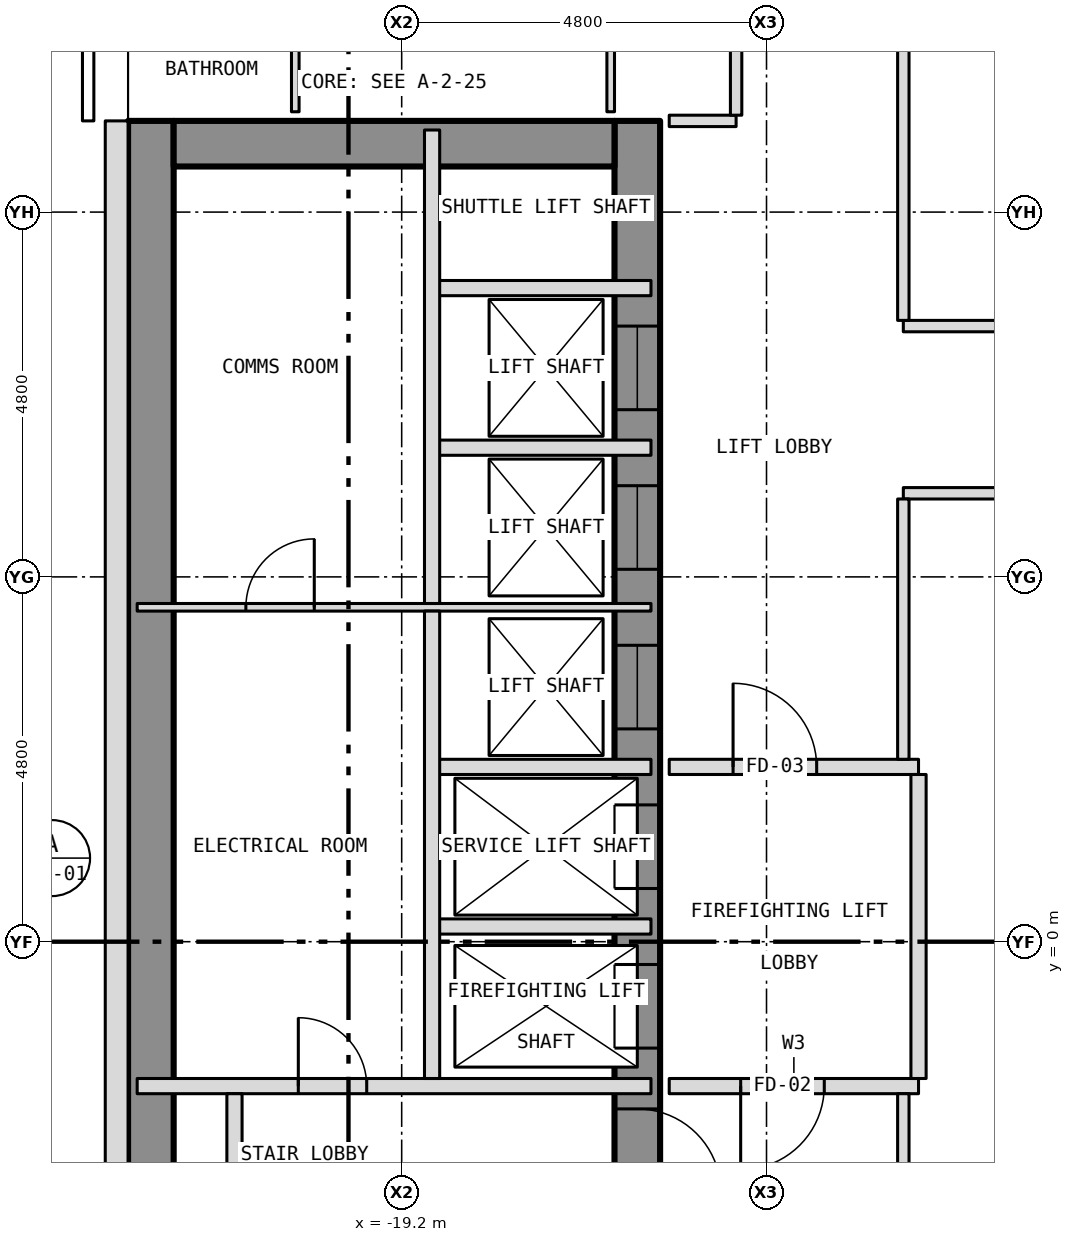
"""IFC4 building model, lengths in metres.
Left out: names, types, materials, properties, quantities, classifications, styles, units other than length and angle.
Written with IfcOpenShell. Run it as: python <this file> out.ifc"""

import sys

from ifc_helpers import new_model, si_unit, direction, frame, frame_2d, origin, place, context, subcontext, project, spatial, rectangle, extrude, element, fill, save


model = new_model("IFC4")
c1 = context("Model", 3, precision=1e-05, world=origin(), true_north=direction((0.0, 1.0)))
c2 = subcontext(c1, "Body", "Model", "MODEL_VIEW")
j1 = project(units=[si_unit("LENGTHUNIT", "METRE"), si_unit("PLANEANGLEUNIT", "RADIAN")], contexts=[c1])
p1 = place(None, origin())
s1 = spatial("IfcSite", under=j1, at=p1, CompositionType="ELEMENT")
p2 = place(p1, origin())
s2 = spatial("IfcBuilding", under=s1, at=p2, CompositionType="ELEMENT")
p3 = place(p2, frame((0.0, 0.0, 92.5)))
s3 = spatial("IfcBuildingStorey", under=s2, at=p3, CompositionType="ELEMENT", Elevation=92.5)
p4 = place(p3, frame((-16.1, -10.8, 0.0), z_axis=(0.0, 0.0, 1.0), x_axis=(0.0, 1.0, 0.0)))
e1 = element("IfcWall", 1, at=p4, inside=s3, PredefinedType="SHEAR", context=c2, shape_type="SweptSolid", body=[
    extrude(rectangle(XDim=21.6, YDim=0.6, at=frame_2d((10.8, 0.0))), origin(), (0.0, 0.0, 1.0), 3.25),
])
p5 = place(p4, frame((9.4, 0.0, 0.0)))
e2 = element("IfcOpeningElement", 2, at=p5, cuts=e1, PredefinedType="OPENING", context=c2, shape_type="SweptSolid", body=[
    extrude(rectangle(XDim=1.1, YDim=2.1, at=frame_2d((0.55, 1.05))), frame((0.0, 0.312, 0.0), z_axis=(0.0, -1.0, 0.0), x_axis=(1.0, 0.0, 0.0)), (0.0, 0.0, 1.0), 0.624),
])
p6 = place(p4, frame((11.5, 0.0, 0.0)))
e3 = element("IfcOpeningElement", 3, at=p6, cuts=e1, PredefinedType="OPENING", context=c2, shape_type="SweptSolid", body=[
    extrude(rectangle(XDim=1.1, YDim=2.1, at=frame_2d((0.55, 1.05))), frame((0.0, 0.312, 0.0), z_axis=(0.0, -1.0, 0.0), x_axis=(1.0, 0.0, 0.0)), (0.0, 0.0, 1.0), 0.624),
])
p7 = place(p4, frame((13.6, 0.0, 0.0)))
e4 = element("IfcOpeningElement", 4, at=p7, cuts=e1, PredefinedType="OPENING", context=c2, shape_type="SweptSolid", body=[
    extrude(rectangle(XDim=1.1, YDim=2.1, at=frame_2d((0.55, 1.05))), frame((0.0, 0.312, 0.0), z_axis=(0.0, -1.0, 0.0), x_axis=(1.0, 0.0, 0.0)), (0.0, 0.0, 1.0), 0.624),
])
p8 = place(p4, frame((15.7, 0.0, 0.0)))
e5 = element("IfcOpeningElement", 5, at=p8, cuts=e1, PredefinedType="OPENING", context=c2, shape_type="SweptSolid", body=[
    extrude(rectangle(XDim=1.1, YDim=2.1, at=frame_2d((0.55, 1.05))), frame((0.0, 0.312, 0.0), z_axis=(0.0, -1.0, 0.0), x_axis=(1.0, 0.0, 0.0)), (0.0, 0.0, 1.0), 0.624),
])
p9 = place(p4, frame((17.8, 0.0, 0.0)))
e6 = element("IfcOpeningElement", 6, at=p9, cuts=e1, PredefinedType="OPENING", context=c2, shape_type="SweptSolid", body=[
    extrude(rectangle(XDim=1.1, YDim=2.1, at=frame_2d((0.55, 1.05))), frame((0.0, 0.312, 0.0), z_axis=(0.0, -1.0, 0.0), x_axis=(1.0, 0.0, 0.0)), (0.0, 0.0, 1.0), 0.624),
])
p10 = place(p4, frame((0.758, 0.0, 0.0)))
e7 = element("IfcOpeningElement", 7, at=p10, cuts=e1, PredefinedType="OPENING", context=c2, shape_type="SweptSolid", body=[
    extrude(rectangle(XDim=1.1, YDim=2.1, at=frame_2d((0.55, 1.05))), frame((0.0, 0.312, 0.0), z_axis=(0.0, -1.0, 0.0), x_axis=(1.0, 0.0, 0.0)), (0.0, 0.0, 1.0), 0.624),
])
p11 = place(p4, frame((7.5, 0.0, 0.0)))
e8 = element("IfcOpeningElement", 8, at=p11, cuts=e1, PredefinedType="OPENING", context=c2, shape_type="SweptSolid", body=[
    extrude(rectangle(XDim=1.1, YDim=2.1, at=frame_2d((0.55, 1.05))), frame((0.0, 0.312, 0.0), z_axis=(0.0, -1.0, 0.0), x_axis=(1.0, 0.0, 0.0)), (0.0, 0.0, 1.0), 0.624),
])
p12 = place(p3, frame((-22.5, -10.8, 0.0), z_axis=(0.0, 0.0, 1.0), x_axis=(0.0, 1.0, 0.0)))
e9 = element("IfcWall", 9, at=p12, inside=s3, PredefinedType="SHEAR", context=c2, shape_type="SweptSolid", body=[
    extrude(rectangle(XDim=21.6, YDim=0.6, at=frame_2d((10.8, 0.0))), origin(), (0.0, 0.0, 1.0), 3.25),
])
p13 = place(p3, frame((-22.2, 10.5, 0.0), z_axis=(0.0, 0.0, 1.0), x_axis=(1.0, 0.0, 0.0)))
e10 = element("IfcWall", 10, at=p13, inside=s3, PredefinedType="SHEAR", context=c2, shape_type="SweptSolid", body=[
    extrude(rectangle(XDim=5.8, YDim=0.6, at=frame_2d((2.9, 0.0))), origin(), (0.0, 0.0, 1.0), 3.25),
])
p14 = place(p3, frame((-22.95, 10.8, 0.0), z_axis=(0.0, 0.0, 1.0), x_axis=(0.0, -1.0, 0.0)))
e11 = element("IfcWall", 11, at=p14, inside=s3, PredefinedType="SOLIDWALL", context=c2, shape_type="SweptSolid", body=[
    extrude(rectangle(XDim=21.6, YDim=0.3, at=frame_2d((10.8, 0.0))), origin(), (0.0, 0.0, 1.0), 3.5),
])
p15 = place(p14, frame((18.05, 0.0, 1.0)))
e12 = element("IfcOpeningElement", 12, at=p15, cuts=e11, PredefinedType="OPENING", context=c2, shape_type="SweptSolid", body=[
    extrude(rectangle(XDim=0.6, YDim=1.5, at=frame_2d((0.3, 0.75))), frame((0.0, 0.162, 0.0), z_axis=(0.0, -1.0, 0.0), x_axis=(1.0, 0.0, 0.0)), (0.0, 0.0, 1.0), 0.324),
])
p16 = place(p3, frame((-22.68, -1.9, 0.0), z_axis=(0.0, 0.0, 1.0), x_axis=(1.0, 0.0, 0.0)))
e13 = element("IfcWall", 13, at=p16, inside=s3, PredefinedType="PARTITIONING", context=c2, shape_type="SweptSolid", body=[
    extrude(rectangle(XDim=6.76, YDim=0.2, at=frame_2d((3.38, 0.0))), origin(), (0.0, 0.0, 1.0), 3.25),
])
p17 = place(p16, frame((2.12, 0.0, 0.0)))
e14 = element("IfcOpeningElement", 14, at=p17, cuts=e13, PredefinedType="OPENING", context=c2, shape_type="SweptSolid", body=[
    extrude(rectangle(XDim=0.9, YDim=2.1, at=frame_2d((0.45, 1.05))), frame((0.0, 0.112, 0.0), z_axis=(0.0, -1.0, 0.0), x_axis=(1.0, 0.0, 0.0)), (0.0, 0.0, 1.0), 0.224),
])
p18 = place(p3, frame((-15.68, -1.9, 0.0), z_axis=(0.0, 0.0, 1.0), x_axis=(1.0, 0.0, 0.0)))
e15 = element("IfcWall", 15, at=p18, inside=s3, PredefinedType="PARTITIONING", context=c2, shape_type="SweptSolid", body=[
    extrude(rectangle(XDim=3.28, YDim=0.2, at=frame_2d((1.64, 0.0))), origin(), (0.0, 0.0, 1.0), 3.35),
])
p19 = place(p18, frame((0.94, 0.0, 0.0)))
e16 = element("IfcOpeningElement", 16, at=p19, cuts=e15, PredefinedType="OPENING", context=c2, shape_type="SweptSolid", body=[
    extrude(rectangle(XDim=1.1, YDim=2.1, at=frame_2d((0.55, 1.05))), frame((0.0, 0.112, 0.0), z_axis=(0.0, -1.0, 0.0), x_axis=(1.0, 0.0, 0.0)), (0.0, 0.0, 1.0), 0.224),
])
for number, where, z_axis, x_axis in (
    (17, (-18.8, 0.2, 0.0), (0.0, 0.0, 1.0), (1.0, 0.0, 0.0)),
    (18, (-18.8, 2.3, 0.0), (0.0, 0.0, 1.0), (1.0, 0.0, 0.0)),
):
    element("IfcWall", number, at=place(p3, frame(where, z_axis=z_axis, x_axis=x_axis)), inside=s3, PredefinedType="PARTITIONING", context=c2, shape_type="SweptSolid", body=[
        extrude(rectangle(XDim=2.88, YDim=0.2, at=frame_2d((1.44, 0.0))), origin(), (0.0, 0.0, 1.0), 3.25),
    ])
p20 = place(p3, frame((-15.68, 2.3, 0.0), z_axis=(0.0, 0.0, 1.0), x_axis=(1.0, 0.0, 0.0)))
e19 = element("IfcWall", 19, at=p20, inside=s3, PredefinedType="PARTITIONING", context=c2, shape_type="SweptSolid", body=[
    extrude(rectangle(XDim=3.28, YDim=0.2, at=frame_2d((1.64, 0.0))), origin(), (0.0, 0.0, 1.0), 3.35),
])
p21 = place(p20, frame((0.84, 0.0, 0.0)))
e20 = element("IfcOpeningElement", 20, at=p21, cuts=e19, PredefinedType="OPENING", context=c2, shape_type="SweptSolid", body=[
    extrude(rectangle(XDim=1.1, YDim=2.1, at=frame_2d((0.55, 1.05))), frame((0.0, 0.112, 0.0), z_axis=(0.0, -1.0, 0.0), x_axis=(1.0, 0.0, 0.0)), (0.0, 0.0, 1.0), 0.224),
])
p22 = place(p3, frame((-22.68, 4.4, 0.0), z_axis=(0.0, 0.0, 1.0), x_axis=(1.0, 0.0, 0.0)))
e21 = element("IfcWall", 21, at=p22, inside=s3, PredefinedType="PARTITIONING", context=c2, shape_type="SweptSolid", body=[
    extrude(rectangle(XDim=6.76, YDim=0.1, at=frame_2d((3.38, 0.0))), origin(), (0.0, 0.0, 1.0), 3.25),
])
p23 = place(p22, frame((1.43, 0.0, 0.0)))
e22 = element("IfcOpeningElement", 22, at=p23, cuts=e21, PredefinedType="OPENING", context=c2, shape_type="SweptSolid", body=[
    extrude(rectangle(XDim=0.9, YDim=2.1, at=frame_2d((0.45, 1.05))), frame((0.0, 0.062, 0.0), z_axis=(0.0, -1.0, 0.0), x_axis=(1.0, 0.0, 0.0)), (0.0, 0.0, 1.0), 0.124),
])
p24 = place(p3, frame((-12.6, 5.9, 0.0), z_axis=(0.0, 0.0, 1.0), x_axis=(1.0, 0.0, 0.0)))
e23 = element("IfcWall", 23, at=p24, inside=s3, PredefinedType="PARTITIONING", context=c2, shape_type="SweptSolid", body=[
    extrude(rectangle(XDim=13.7, YDim=0.15, at=frame_2d((6.85, 0.0))), origin(), (0.0, 0.0, 1.0), 3.35),
])
p25 = place(p3, frame((-18.8, 6.5, 0.0), z_axis=(0.0, 0.0, 1.0), x_axis=(1.0, 0.0, 0.0)))
e24 = element("IfcWall", 24, at=p25, inside=s3, PredefinedType="PARTITIONING", context=c2, shape_type="SweptSolid", body=[
    extrude(rectangle(XDim=2.88, YDim=0.2, at=frame_2d((1.44, 0.0))), origin(), (0.0, 0.0, 1.0), 3.25),
])
p26 = place(p3, frame((-12.6, 8.1, 0.0), z_axis=(0.0, 0.0, 1.0), x_axis=(1.0, 0.0, 0.0)))
e25 = element("IfcWall", 25, at=p26, inside=s3, PredefinedType="PARTITIONING", context=c2, shape_type="SweptSolid", body=[
    extrude(rectangle(XDim=13.7, YDim=0.15, at=frame_2d((6.85, 0.0))), origin(), (0.0, 0.0, 1.0), 3.35),
])
p27 = place(p26, frame((6.4, 0.0, 0.0)))
e26 = element("IfcOpeningElement", 26, at=p27, cuts=e25, PredefinedType="OPENING", context=c2, shape_type="SweptSolid", body=[
    extrude(rectangle(XDim=0.9, YDim=2.1, at=frame_2d((0.45, 1.05))), frame((0.0, 0.087, 0.0), z_axis=(0.0, -1.0, 0.0), x_axis=(1.0, 0.0, 0.0)), (0.0, 0.0, 1.0), 0.174),
])
p28 = place(p3, frame((-18.8, 8.6, 0.0), z_axis=(0.0, 0.0, 1.0), x_axis=(1.0, 0.0, 0.0)))
e27 = element("IfcWall", 27, at=p28, inside=s3, PredefinedType="PARTITIONING", context=c2, shape_type="SweptSolid", body=[
    extrude(rectangle(XDim=2.88, YDim=0.2, at=frame_2d((1.44, 0.0))), origin(), (0.0, 0.0, 1.0), 3.25),
])
p29 = place(p3, frame((-15.68, 10.8, 0.0), z_axis=(0.0, 0.0, 1.0), x_axis=(1.0, 0.0, 0.0)))
e28 = element("IfcWall", 28, at=p29, inside=s3, PredefinedType="PARTITIONING", context=c2, shape_type="SweptSolid", body=[
    extrude(rectangle(XDim=0.88, YDim=0.15, at=frame_2d((0.44, 0.0))), origin(), (0.0, 0.0, 1.0), 3.35),
])
p30 = place(p3, frame((-21.4, -10.68, 0.0), z_axis=(0.0, 0.0, 1.0), x_axis=(0.0, 1.0, 0.0)))
e29 = element("IfcWall", 29, at=p30, inside=s3, PredefinedType="PARTITIONING", context=c2, shape_type="SweptSolid", body=[
    extrude(rectangle(XDim=8.68, YDim=0.2, at=frame_2d((4.34, 0.0))), origin(), (0.0, 0.0, 1.0), 3.25),
])
p31 = place(p30, frame((0.899, 0.0, 0.0)))
e30 = element("IfcOpeningElement", 30, at=p31, cuts=e29, PredefinedType="OPENING", context=c2, shape_type="SweptSolid", body=[
    extrude(rectangle(XDim=0.9, YDim=2.1, at=frame_2d((0.45, 1.05))), frame((0.0, 0.112, 0.0), z_axis=(0.0, -1.0, 0.0), x_axis=(1.0, 0.0, 0.0)), (0.0, 0.0, 1.0), 0.224),
])
p32 = place(p30, frame((3.569, 0.0, 0.0)))
e31 = element("IfcOpeningElement", 31, at=p32, cuts=e29, PredefinedType="OPENING", context=c2, shape_type="SweptSolid", body=[
    extrude(rectangle(XDim=0.9, YDim=2.1, at=frame_2d((0.45, 1.05))), frame((0.0, 0.112, 0.0), z_axis=(0.0, -1.0, 0.0), x_axis=(1.0, 0.0, 0.0)), (0.0, 0.0, 1.0), 0.224),
])
p33 = place(p30, frame((6.55, 0.0, 0.0)))
e32 = element("IfcOpeningElement", 32, at=p33, cuts=e29, PredefinedType="OPENING", context=c2, shape_type="SweptSolid", body=[
    extrude(rectangle(XDim=0.9, YDim=2.1, at=frame_2d((0.45, 1.05))), frame((0.0, 0.112, 0.0), z_axis=(0.0, -1.0, 0.0), x_axis=(1.0, 0.0, 0.0)), (0.0, 0.0, 1.0), 0.224),
])
p34 = place(p3, frame((-20.6, 10.92, 0.0), z_axis=(0.0, 0.0, 1.0), x_axis=(0.0, 1.0, 0.0)))
e33 = element("IfcWall", 33, at=p34, inside=s3, PredefinedType="PARTITIONING", context=c2, shape_type="SweptSolid", body=[
    extrude(rectangle(XDim=3.03, YDim=0.1, at=frame_2d((1.515, 0.0))), origin(), (0.0, 0.0, 1.0), 3.35),
])
p35 = place(p34, frame((1.67, 0.0, 0.0)))
e34 = element("IfcOpeningElement", 34, at=p35, cuts=e33, PredefinedType="OPENING", context=c2, shape_type="SweptSolid", body=[
    extrude(rectangle(XDim=0.9, YDim=2.1, at=frame_2d((0.45, 1.05))), frame((0.0, 0.062, 0.0), z_axis=(0.0, -1.0, 0.0), x_axis=(1.0, 0.0, 0.0)), (0.0, 0.0, 1.0), 0.124),
])
p36 = place(p3, frame((-18.8, -1.8, 0.0), z_axis=(0.0, 0.0, 1.0), x_axis=(0.0, 1.0, 0.0)))
e35 = element("IfcWall", 35, at=p36, inside=s3, PredefinedType="PARTITIONING", context=c2, shape_type="SweptSolid", body=[
    extrude(rectangle(XDim=6.15, YDim=0.2, at=frame_2d((3.075, 0.0))), origin(), (0.0, 0.0, 1.0), 3.25),
])
p37 = place(p3, frame((-18.8, 4.45, 0.0), z_axis=(0.0, 0.0, 1.0), x_axis=(0.0, 1.0, 0.0)))
e36 = element("IfcWall", 36, at=p37, inside=s3, PredefinedType="PARTITIONING", context=c2, shape_type="SweptSolid", body=[
    extrude(rectangle(XDim=6.23, YDim=0.2, at=frame_2d((3.115, 0.0))), origin(), (0.0, 0.0, 1.0), 3.25),
])
p38 = place(p3, frame((-16.45, 10.92, 0.0), z_axis=(0.0, 0.0, 1.0), x_axis=(0.0, 1.0, 0.0)))
e37 = element("IfcWall", 37, at=p38, inside=s3, PredefinedType="PARTITIONING", context=c2, shape_type="SweptSolid", body=[
    extrude(rectangle(XDim=12.36, YDim=0.1, at=frame_2d((6.18, 0.0))), origin(), (0.0, 0.0, 1.0), 3.35),
])
p39 = place(p38, frame((5.43, 0.0, 0.0)))
e38 = element("IfcOpeningElement", 38, at=p39, cuts=e37, PredefinedType="OPENING", context=c2, shape_type="SweptSolid", body=[
    extrude(rectangle(XDim=0.9, YDim=2.1, at=frame_2d((0.45, 1.05))), frame((0.0, 0.062, 0.0), z_axis=(0.0, -1.0, 0.0), x_axis=(1.0, 0.0, 0.0)), (0.0, 0.0, 1.0), 0.124),
])
p40 = place(p3, frame((-14.8, 10.875, 0.0), z_axis=(0.0, 0.0, 1.0), x_axis=(0.0, 1.0, 0.0)))
e39 = element("IfcWall", 39, at=p40, inside=s3, PredefinedType="PARTITIONING", context=c2, shape_type="SweptSolid", body=[
    extrude(rectangle(XDim=3.85, YDim=0.15, at=frame_2d((1.925, 0.0))), origin(), (0.0, 0.0, 1.0), 3.35),
])
p41 = place(p40, frame((2.325, 0.0, 0.0)))
e40 = element("IfcOpeningElement", 40, at=p41, cuts=e39, PredefinedType="OPENING", context=c2, shape_type="SweptSolid", body=[
    extrude(rectangle(XDim=1.0, YDim=2.1, at=frame_2d((0.5, 1.05))), frame((0.0, 0.087, 0.0), z_axis=(0.0, -1.0, 0.0), x_axis=(1.0, 0.0, 0.0)), (0.0, 0.0, 1.0), 0.174),
])
p42 = place(p3, frame((-12.6, -12.525, 0.0), z_axis=(0.0, 0.0, 1.0), x_axis=(0.0, 1.0, 0.0)))
e41 = element("IfcWall", 41, at=p42, inside=s3, PredefinedType="PARTITIONING", context=c2, shape_type="SweptSolid", body=[
    extrude(rectangle(XDim=10.525, YDim=0.15, at=frame_2d((5.262, 0.0))), origin(), (0.0, 0.0, 1.0), 3.35),
])
p43 = place(p3, frame((-12.6, 2.4, 0.0), z_axis=(0.0, 0.0, 1.0), x_axis=(0.0, 1.0, 0.0)))
e42 = element("IfcWall", 42, at=p43, inside=s3, PredefinedType="PARTITIONING", context=c2, shape_type="SweptSolid", body=[
    extrude(rectangle(XDim=3.425, YDim=0.15, at=frame_2d((1.712, 0.0))), origin(), (0.0, 0.0, 1.0), 3.35),
])
p44 = place(p3, frame((-12.6, 8.175, 0.0), z_axis=(0.0, 0.0, 1.0), x_axis=(0.0, 1.0, 0.0)))
e43 = element("IfcWall", 43, at=p44, inside=s3, PredefinedType="PARTITIONING", context=c2, shape_type="SweptSolid", body=[
    extrude(rectangle(XDim=4.35, YDim=0.15, at=frame_2d((2.175, 0.0))), origin(), (0.0, 0.0, 1.0), 3.35),
])
p45 = place(p3, frame((-12.4, -1.8, 0.0), z_axis=(0.0, 0.0, 1.0), x_axis=(0.0, 1.0, 0.0)))
e44 = element("IfcWall", 44, at=p45, inside=s3, PredefinedType="PARTITIONING", context=c2, shape_type="SweptSolid", body=[
    extrude(rectangle(XDim=4.0, YDim=0.2, at=frame_2d((2.0, 0.0))), origin(), (0.0, 0.0, 1.0), 3.35),
])
p46 = place(p5, origin())
e45 = element("IfcDoor", 45, at=p46, inside=s3, OperationType="SLIDING_TO_LEFT", PredefinedType="DOOR", context=c2, shape_type="SweptSolid", body=[
    extrude(rectangle(XDim=1.1, YDim=2.1, at=frame_2d((0.55, 1.05))), frame((0.0, 0.025, 0.0), z_axis=(0.0, -1.0, 0.0), x_axis=(1.0, 0.0, 0.0)), (0.0, 0.0, 1.0), 0.05),
])
fill(e2, e45)
p47 = place(p6, origin())
e46 = element("IfcDoor", 46, at=p47, inside=s3, OperationType="SLIDING_TO_LEFT", PredefinedType="DOOR", context=c2, shape_type="SweptSolid", body=[
    extrude(rectangle(XDim=1.1, YDim=2.1, at=frame_2d((0.55, 1.05))), frame((0.0, 0.025, 0.0), z_axis=(0.0, -1.0, 0.0), x_axis=(1.0, 0.0, 0.0)), (0.0, 0.0, 1.0), 0.05),
])
fill(e3, e46)
p48 = place(p7, origin())
e47 = element("IfcDoor", 47, at=p48, inside=s3, OperationType="SLIDING_TO_LEFT", PredefinedType="DOOR", context=c2, shape_type="SweptSolid", body=[
    extrude(rectangle(XDim=1.1, YDim=2.1, at=frame_2d((0.55, 1.05))), frame((0.0, 0.025, 0.0), z_axis=(0.0, -1.0, 0.0), x_axis=(1.0, 0.0, 0.0)), (0.0, 0.0, 1.0), 0.05),
])
fill(e4, e47)
p49 = place(p8, origin())
e48 = element("IfcDoor", 48, at=p49, inside=s3, OperationType="SLIDING_TO_LEFT", PredefinedType="DOOR", context=c2, shape_type="SweptSolid", body=[
    extrude(rectangle(XDim=1.1, YDim=2.1, at=frame_2d((0.55, 1.05))), frame((0.0, 0.025, 0.0), z_axis=(0.0, -1.0, 0.0), x_axis=(1.0, 0.0, 0.0)), (0.0, 0.0, 1.0), 0.05),
])
fill(e5, e48)
p50 = place(p9, origin())
e49 = element("IfcDoor", 49, at=p50, inside=s3, OperationType="SLIDING_TO_LEFT", PredefinedType="DOOR", context=c2, shape_type="SweptSolid", body=[
    extrude(rectangle(XDim=1.1, YDim=2.1, at=frame_2d((0.55, 1.05))), frame((0.0, 0.025, 0.0), z_axis=(0.0, -1.0, 0.0), x_axis=(1.0, 0.0, 0.0)), (0.0, 0.0, 1.0), 0.05),
])
fill(e6, e49)
p51 = place(p11, origin())
e50 = element("IfcDoor", 50, at=p51, inside=s3, OperationType="SINGLE_SWING_LEFT", PredefinedType="DOOR", context=c2, shape_type="SweptSolid", body=[
    extrude(rectangle(XDim=1.1, YDim=2.1, at=frame_2d((0.55, 1.05))), frame((0.0, 0.025, 0.0), z_axis=(0.0, -1.0, 0.0), x_axis=(1.0, 0.0, 0.0)), (0.0, 0.0, 1.0), 0.05),
])
fill(e8, e50)
p52 = place(p17, origin())
e51 = element("IfcDoor", 51, at=p52, inside=s3, OperationType="SINGLE_SWING_LEFT", PredefinedType="DOOR", context=c2, shape_type="SweptSolid", body=[
    extrude(rectangle(XDim=0.9, YDim=2.1, at=frame_2d((0.45, 1.05))), frame((0.0, 0.025, 0.0), z_axis=(0.0, -1.0, 0.0), x_axis=(1.0, 0.0, 0.0)), (0.0, 0.0, 1.0), 0.05),
])
fill(e14, e51)
p53 = place(p23, origin())
e52 = element("IfcDoor", 52, at=p53, inside=s3, OperationType="SINGLE_SWING_RIGHT", PredefinedType="DOOR", context=c2, shape_type="SweptSolid", body=[
    extrude(rectangle(XDim=0.9, YDim=2.1, at=frame_2d((0.45, 1.05))), frame((0.0, 0.025, 0.0), z_axis=(0.0, -1.0, 0.0), x_axis=(1.0, 0.0, 0.0)), (0.0, 0.0, 1.0), 0.05),
])
fill(e22, e52)
p54 = place(p19, origin())
e53 = element("IfcDoor", 53, at=p54, inside=s3, OperationType="SINGLE_SWING_LEFT", PredefinedType="DOOR", context=c2, shape_type="SweptSolid", body=[
    extrude(rectangle(XDim=1.1, YDim=2.1, at=frame_2d((0.55, 1.05))), frame((0.0, 0.025, 0.0), z_axis=(0.0, -1.0, 0.0), x_axis=(1.0, 0.0, 0.0)), (0.0, 0.0, 1.0), 0.05),
])
fill(e16, e53)
p55 = place(p21, origin())
e54 = element("IfcDoor", 54, at=p55, inside=s3, OperationType="SINGLE_SWING_LEFT", PredefinedType="DOOR", context=c2, shape_type="SweptSolid", body=[
    extrude(rectangle(XDim=1.1, YDim=2.1, at=frame_2d((0.55, 1.05))), frame((0.0, 0.025, 0.0), z_axis=(0.0, -1.0, 0.0), x_axis=(1.0, 0.0, 0.0)), (0.0, 0.0, 1.0), 0.05),
])
fill(e20, e54)
save(model, sys.argv[1])
